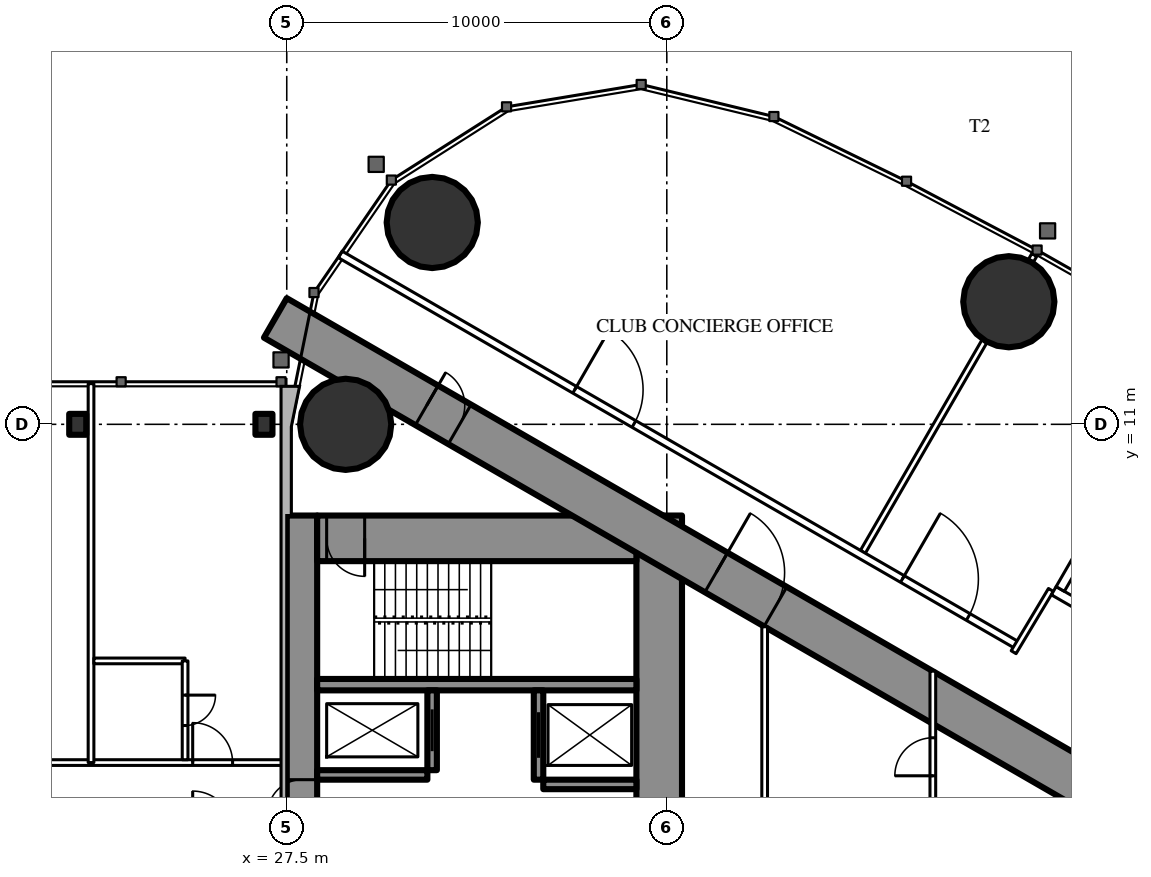
"""IFC4 building model, lengths in metres.
Left out: names, types, materials, properties, quantities, classifications, styles, units other than length and angle.
Written with IfcOpenShell. Run it as: python <this file> out.ifc"""

import sys

from ifc_helpers import new_model, si_unit, direction, frame, frame_2d, origin, origin_2d, place, context, subcontext, project, spatial, rectangle, circle, i_section, extrude, element, fill, save


model = new_model("IFC4")
c1 = context("Model", 3, precision=1e-05, world=origin(), true_north=direction((0.0, 1.0)))
c2 = subcontext(c1, "Body", "Model", "MODEL_VIEW")
j1 = project(units=[si_unit("LENGTHUNIT", "METRE"), si_unit("PLANEANGLEUNIT", "RADIAN")], contexts=[c1])
p1 = place(None, origin())
s1 = spatial("IfcSite", under=j1, at=p1, CompositionType="ELEMENT")
p2 = place(p1, origin())
s2 = spatial("IfcBuilding", under=s1, at=p2, CompositionType="ELEMENT")
p3 = place(p2, frame((0.0, 0.0, 247.7)))
s3 = spatial("IfcBuildingStorey", under=s2, at=p3, CompositionType="ELEMENT", Elevation=247.7)
for number, where, z_axis, x_axis in (
    (1, (31.328, 16.311, 0.0), (0.0, 0.0, 1.0), (1.0, 0.0, 0.0)),
    (2, (29.05, 11.0, 0.0), (0.0, 0.0, 1.0), (1.0, 0.0, 0.0)),
    (3, (46.499, 14.226, 0.0), (0.0, 0.0, 1.0), (1.0, 0.0, 0.0)),
):
    element("IfcColumn", number, at=place(p3, frame(where, z_axis=z_axis, x_axis=x_axis)), inside=s3, PredefinedType="COLUMN", context=c2, shape_type="SweptSolid", body=[
        extrude(circle(Radius=1.2, at=origin_2d()), origin(), (0.0, 0.0, 1.0), 4.2),
    ])
p4 = place(p3, frame((27.9, -8.6, 0.0), z_axis=(0.0, 0.0, 1.0), x_axis=(0.0, 1.0, 0.0)))
e4 = element("IfcWall", 4, at=p4, inside=s3, PredefinedType="SHEAR", context=c2, shape_type="SweptSolid", body=[
    extrude(rectangle(XDim=17.2, YDim=0.8, at=frame_2d((8.6, 0.0))), origin(), (0.0, 0.0, 1.0), 4.2),
])
p5 = place(p4, frame((9.35, 0.0, 0.0)))
e5 = element("IfcOpeningElement", 5, at=p5, cuts=e4, PredefinedType="OPENING", context=c2, shape_type="SweptSolid", body=[
    extrude(rectangle(XDim=0.9, YDim=2.2, at=frame_2d((0.45, 1.1))), frame((0.0, 0.41, 0.0), z_axis=(0.0, -1.0, 0.0), x_axis=(1.0, 0.0, 0.0)), (0.0, 0.0, 1.0), 0.82),
])
p6 = place(p3, frame((37.3, -8.6, 0.0), z_axis=(0.0, 0.0, 1.0), x_axis=(0.0, 1.0, 0.0)))
e6 = element("IfcWall", 6, at=p6, inside=s3, PredefinedType="SHEAR", context=c2, shape_type="SweptSolid", body=[
    extrude(rectangle(XDim=17.2, YDim=1.2, at=frame_2d((8.6, 0.0))), origin(), (0.0, 0.0, 1.0), 4.2),
])
p7 = place(p6, frame((7.7, 0.0, 0.0)))
e7 = element("IfcOpeningElement", 7, at=p7, cuts=e6, PredefinedType="OPENING", context=c2, shape_type="SweptSolid", body=[
    extrude(rectangle(XDim=1.8, YDim=2.2, at=frame_2d((0.9, 1.1))), frame((0.0, 0.61, 0.0), z_axis=(0.0, -1.0, 0.0), x_axis=(1.0, 0.0, 0.0)), (0.0, 0.0, 1.0), 1.22),
])
p8 = place(p3, frame((28.3, 8.0, 0.0), z_axis=(0.0, 0.0, 1.0), x_axis=(1.0, 0.0, 0.0)))
e8 = element("IfcWall", 8, at=p8, inside=s3, PredefinedType="SHEAR", context=c2, shape_type="SweptSolid", body=[
    extrude(rectangle(XDim=8.4, YDim=1.2, at=frame_2d((4.2, 0.0))), origin(), (0.0, 0.0, 1.0), 4.2),
])
p9 = place(p8, frame((0.25, 0.0, 0.0)))
e9 = element("IfcOpeningElement", 9, at=p9, cuts=e8, PredefinedType="OPENING", context=c2, shape_type="SweptSolid", body=[
    extrude(rectangle(XDim=1.0, YDim=2.2, at=frame_2d((0.5, 1.1))), frame((0.0, 0.61, 0.0), z_axis=(0.0, -1.0, 0.0), x_axis=(1.0, 0.0, 0.0)), (0.0, 0.0, 1.0), 1.22),
])
p10 = place(p3, frame((28.3, 4.15, 0.0), z_axis=(0.0, 0.0, 1.0), x_axis=(1.0, 0.0, 0.0)))
e10 = element("IfcWall", 10, at=p10, inside=s3, PredefinedType="SHEAR", context=c2, shape_type="SweptSolid", body=[
    extrude(rectangle(XDim=8.4, YDim=0.3, at=frame_2d((4.2, 0.0))), origin(), (0.0, 0.0, 1.0), 4.2),
])
p11 = place(p3, frame((31.325, 1.9, 0.0), z_axis=(0.0, 0.0, 1.0), x_axis=(0.0, 1.0, 0.0)))
e11 = element("IfcWall", 11, at=p11, inside=s3, PredefinedType="SHEAR", context=c2, shape_type="SweptSolid", body=[
    extrude(rectangle(XDim=2.1, YDim=0.25, at=frame_2d((1.05, 0.0))), origin(), (0.0, 0.0, 1.0), 4.2),
])
p12 = place(p11, frame((0.5, 0.0, 0.0)))
e12 = element("IfcOpeningElement", 12, at=p12, cuts=e11, PredefinedType="OPENING", context=c2, shape_type="SweptSolid", body=[
    extrude(rectangle(XDim=1.1, YDim=2.2, at=frame_2d((0.55, 1.1))), frame((0.0, 0.135, 0.0), z_axis=(0.0, -1.0, 0.0), x_axis=(1.0, 0.0, 0.0)), (0.0, 0.0, 1.0), 0.27),
])
p13 = place(p3, frame((34.125, 1.65, 0.0), z_axis=(0.0, 0.0, 1.0), x_axis=(0.0, 1.0, 0.0)))
e13 = element("IfcWall", 13, at=p13, inside=s3, PredefinedType="SHEAR", context=c2, shape_type="SweptSolid", body=[
    extrude(rectangle(XDim=2.35, YDim=0.25, at=frame_2d((1.175, 0.0))), origin(), (0.0, 0.0, 1.0), 4.2),
])
p14 = place(p13, frame((0.575, 0.0, 0.0)))
e14 = element("IfcOpeningElement", 14, at=p14, cuts=e13, PredefinedType="OPENING", context=c2, shape_type="SweptSolid", body=[
    extrude(rectangle(XDim=1.2, YDim=2.2, at=frame_2d((0.6, 1.1))), frame((0.0, 0.135, 0.0), z_axis=(0.0, -1.0, 0.0), x_axis=(1.0, 0.0, 0.0)), (0.0, 0.0, 1.0), 0.27),
])
p15 = place(p3, frame((28.3, 1.775, 0.0), z_axis=(0.0, 0.0, 1.0), x_axis=(1.0, 0.0, 0.0)))
e15 = element("IfcWall", 15, at=p15, inside=s3, PredefinedType="SHEAR", context=c2, shape_type="SweptSolid", body=[
    extrude(rectangle(XDim=2.9, YDim=0.25, at=frame_2d((1.45, 0.0))), origin(), (0.0, 0.0, 1.0), 4.2),
])
p16 = place(p3, frame((34.25, 1.525, 0.0), z_axis=(0.0, 0.0, 1.0), x_axis=(1.0, 0.0, 0.0)))
e16 = element("IfcWall", 16, at=p16, inside=s3, PredefinedType="SHEAR", context=c2, shape_type="SweptSolid", body=[
    extrude(rectangle(XDim=2.45, YDim=0.25, at=frame_2d((1.225, 0.0))), origin(), (0.0, 0.0, 1.0), 4.2),
])
p17 = place(p3, frame((27.2, 13.8, 0.0), z_axis=(0.0, 0.0, 1.0), x_axis=(0.866024515034, -0.500001539357, 0.0)))
e17 = element("IfcWall", 17, at=p17, inside=s3, PredefinedType="SHEAR", context=c2, shape_type="SweptSolid", body=[
    extrude(rectangle(XDim=26.907, YDim=1.2, at=frame_2d((13.454, 0.0))), origin(), (0.0, 0.0, 1.0), 4.2),
])
p18 = place(p17, frame((4.6, 0.0, 0.0)))
e18 = element("IfcOpeningElement", 18, at=p18, cuts=e17, PredefinedType="OPENING", context=c2, shape_type="SweptSolid", body=[
    extrude(rectangle(XDim=1.0, YDim=2.2, at=frame_2d((0.5, 1.1))), frame((0.0, 0.61, 0.0), z_axis=(0.0, -1.0, 0.0), x_axis=(1.0, 0.0, 0.0)), (0.0, 0.0, 1.0), 1.22),
])
p19 = place(p17, frame((13.395, 0.0, 0.0)))
e19 = element("IfcOpeningElement", 19, at=p19, cuts=e17, PredefinedType="OPENING", context=c2, shape_type="SweptSolid", body=[
    extrude(rectangle(XDim=1.8, YDim=2.2, at=frame_2d((0.9, 1.1))), frame((0.0, 0.61, 0.0), z_axis=(0.0, -1.0, 0.0), x_axis=(1.0, 0.0, 0.0)), (0.0, 0.0, 1.0), 1.22),
])
for number, where, z_axis, x_axis in (
    (20, (22.0, 11.0, 0.0), (0.0, 0.0, 1.0), (1.0, 0.0, 0.0)),
    (21, (26.9, 11.0, 0.0), (0.0, 0.0, 1.0), (1.0, 0.0, 0.0)),
):
    element("IfcColumn", number, at=place(p3, frame(where, z_axis=z_axis, x_axis=x_axis)), inside=s3, PredefinedType="COLUMN", context=c2, shape_type="SweptSolid", body=[
        extrude(i_section(OverallWidth=0.448, OverallDepth=0.55, WebThickness=0.072, FlangeThickness=0.115, FilletRadius=0.02, at=origin_2d()), origin(), (0.0, 0.0, 1.0), 4.2),
    ])
p20 = place(p3, frame((42.66, 7.646, 0.0), z_axis=(0.0, 0.0, 1.0), x_axis=(0.499996592859, 0.866027370889, 0.0)))
e22 = element("IfcWall", 22, at=p20, inside=s3, PredefinedType="PARTITIONING", context=c2, shape_type="SweptSolid", body=[
    extrude(rectangle(XDim=6.398, YDim=0.15, at=frame_2d((3.199, 0.0))), origin(), (0.0, 0.0, 1.0), 3.05),
])
p21 = place(p3, frame((47.079, 15.3, 0.0), z_axis=(0.0, 0.0, 1.0), x_axis=(0.499212083968, 0.866479829667, 0.0)))
e23 = element("IfcWall", 23, at=p21, inside=s3, PredefinedType="PARTITIONING", context=c2, shape_type="SweptSolid", body=[
    extrude(rectangle(XDim=0.179, YDim=0.15, at=frame_2d((0.09, 0.0))), origin(), (0.0, 0.0, 1.0), 3.05),
])
p22 = place(p3, frame((28.907, 15.47, 0.0), z_axis=(0.0, 0.0, 1.0), x_axis=(0.866026627509, -0.499997880441, 0.0)))
e24 = element("IfcWall", 24, at=p22, inside=s3, PredefinedType="PARTITIONING", context=c2, shape_type="SweptSolid", body=[
    extrude(rectangle(XDim=20.563, YDim=0.2, at=frame_2d((10.282, 0.0))), origin(), (0.0, 0.0, 1.0), 3.95),
])
p23 = place(p22, frame((17.081, 0.0, 0.0)))
e25 = element("IfcOpeningElement", 25, at=p23, cuts=e24, PredefinedType="OPENING", context=c2, shape_type="SweptSolid", body=[
    extrude(rectangle(XDim=2.0, YDim=2.4, at=frame_2d((1.0, 1.2))), frame((0.0, 0.11, 0.0), z_axis=(0.0, -1.0, 0.0), x_axis=(1.0, 0.0, 0.0)), (0.0, 0.0, 1.0), 0.22),
])
p24 = place(p22, frame((7.124, 0.0, 0.0)))
e26 = element("IfcOpeningElement", 26, at=p24, cuts=e24, PredefinedType="OPENING", context=c2, shape_type="SweptSolid", body=[
    extrude(rectangle(XDim=1.8, YDim=2.2, at=frame_2d((0.9, 1.1))), frame((0.0, 0.11, 0.0), z_axis=(0.0, -1.0, 0.0), x_axis=(1.0, 0.0, 0.0)), (0.0, 0.0, 1.0), 0.22),
])
p25 = place(p3, frame((47.606, 6.642, 0.0), z_axis=(0.0, 0.0, 1.0), x_axis=(-0.51353662755, -0.858067673418, 0.0)))
e27 = element("IfcWall", 27, at=p25, inside=s3, PredefinedType="PARTITIONING", context=c2, shape_type="SweptSolid", body=[
    extrude(rectangle(XDim=1.91, YDim=0.15, at=frame_2d((0.955, 0.0))), origin(), (0.0, 0.0, 1.0), 3.95),
])
p26 = place(p3, frame((40.075, -5.674, 0.0), z_axis=(0.0, 0.0, 1.0), x_axis=(0.0, 1.0, 0.0)))
e28 = element("IfcWall", 28, at=p26, inside=s3, PredefinedType="PARTITIONING", context=c2, shape_type="SweptSolid", body=[
    extrude(rectangle(XDim=11.348, YDim=0.15, at=frame_2d((5.674, 0.0))), origin(), (0.0, 0.0, 1.0), 3.95),
])
p27 = place(p26, frame((4.774, 0.0, 0.0)))
e29 = element("IfcOpeningElement", 29, at=p27, cuts=e28, PredefinedType="OPENING", context=c2, shape_type="SweptSolid", body=[
    extrude(rectangle(XDim=1.8, YDim=2.2, at=frame_2d((0.9, 1.1))), frame((0.0, 0.085, 0.0), z_axis=(0.0, -1.0, 0.0), x_axis=(1.0, 0.0, 0.0)), (0.0, 0.0, 1.0), 0.17),
])
p28 = place(p3, frame((44.5, -4.505, 0.0), z_axis=(0.0, 0.0, 1.0), x_axis=(0.0, 1.0, 0.0)))
e30 = element("IfcWall", 30, at=p28, inside=s3, PredefinedType="PARTITIONING", context=c2, shape_type="SweptSolid", body=[
    extrude(rectangle(XDim=9.009, YDim=0.15, at=frame_2d((4.505, 0.0))), origin(), (0.0, 0.0, 1.0), 3.95),
])
p29 = place(p28, frame((1.752, 0.0, 0.0)))
e31 = element("IfcOpeningElement", 31, at=p29, cuts=e30, PredefinedType="OPENING", context=c2, shape_type="SweptSolid", body=[
    extrude(rectangle(XDim=1.0, YDim=2.2, at=frame_2d((0.5, 1.1))), frame((0.0, 0.085, 0.0), z_axis=(0.0, -1.0, 0.0), x_axis=(1.0, 0.0, 0.0)), (0.0, 0.0, 1.0), 0.17),
])
p30 = place(p28, frame((6.257, 0.0, 0.0)))
e32 = element("IfcOpeningElement", 32, at=p30, cuts=e30, PredefinedType="OPENING", context=c2, shape_type="SweptSolid", body=[
    extrude(rectangle(XDim=1.0, YDim=2.2, at=frame_2d((0.5, 1.1))), frame((0.0, 0.085, 0.0), z_axis=(0.0, -1.0, 0.0), x_axis=(1.0, 0.0, 0.0)), (0.0, 0.0, 1.0), 0.17),
])
p31 = place(p3, frame((-27.5, 2.1, 0.0), z_axis=(0.0, 0.0, 1.0), x_axis=(1.0, 0.0, 0.0)))
e33 = element("IfcWall", 33, at=p31, inside=s3, PredefinedType="PARTITIONING", context=c2, shape_type="SweptSolid", body=[
    extrude(rectangle(XDim=55.0, YDim=0.15, at=frame_2d((27.5, 0.0))), origin(), (0.0, 0.0, 1.0), 4.0),
])
p32 = place(p31, frame((2.025, 0.0, 0.0)))
e34 = element("IfcOpeningElement", 34, at=p32, cuts=e33, PredefinedType="OPENING", context=c2, shape_type="SweptSolid", body=[
    extrude(rectangle(XDim=1.05, YDim=2.4, at=frame_2d((0.525, 1.2))), frame((0.0, 0.085, 0.0), z_axis=(0.0, -1.0, 0.0), x_axis=(1.0, 0.0, 0.0)), (0.0, 0.0, 1.0), 0.17),
])
p33 = place(p31, frame((8.525, 0.0, 0.0)))
e35 = element("IfcOpeningElement", 35, at=p33, cuts=e33, PredefinedType="OPENING", context=c2, shape_type="SweptSolid", body=[
    extrude(rectangle(XDim=1.05, YDim=2.4, at=frame_2d((0.525, 1.2))), frame((0.0, 0.085, 0.0), z_axis=(0.0, -1.0, 0.0), x_axis=(1.0, 0.0, 0.0)), (0.0, 0.0, 1.0), 0.17),
])
p34 = place(p31, frame((19.525, 0.0, 0.0)))
e36 = element("IfcOpeningElement", 36, at=p34, cuts=e33, PredefinedType="OPENING", context=c2, shape_type="SweptSolid", body=[
    extrude(rectangle(XDim=1.05, YDim=2.4, at=frame_2d((0.525, 1.2))), frame((0.0, 0.085, 0.0), z_axis=(0.0, -1.0, 0.0), x_axis=(1.0, 0.0, 0.0)), (0.0, 0.0, 1.0), 0.17),
])
p35 = place(p31, frame((30.525, 0.0, 0.0)))
e37 = element("IfcOpeningElement", 37, at=p35, cuts=e33, PredefinedType="OPENING", context=c2, shape_type="SweptSolid", body=[
    extrude(rectangle(XDim=1.05, YDim=2.4, at=frame_2d((0.525, 1.2))), frame((0.0, 0.085, 0.0), z_axis=(0.0, -1.0, 0.0), x_axis=(1.0, 0.0, 0.0)), (0.0, 0.0, 1.0), 0.17),
])
p36 = place(p31, frame((41.525, 0.0, 0.0)))
e38 = element("IfcOpeningElement", 38, at=p36, cuts=e33, PredefinedType="OPENING", context=c2, shape_type="SweptSolid", body=[
    extrude(rectangle(XDim=1.05, YDim=2.4, at=frame_2d((0.525, 1.2))), frame((0.0, 0.085, 0.0), z_axis=(0.0, -1.0, 0.0), x_axis=(1.0, 0.0, 0.0)), (0.0, 0.0, 1.0), 0.17),
])
p37 = place(p31, frame((52.525, 0.0, 0.0)))
e39 = element("IfcOpeningElement", 39, at=p37, cuts=e33, PredefinedType="OPENING", context=c2, shape_type="SweptSolid", body=[
    extrude(rectangle(XDim=1.05, YDim=2.4, at=frame_2d((0.525, 1.2))), frame((0.0, 0.085, 0.0), z_axis=(0.0, -1.0, 0.0), x_axis=(1.0, 0.0, 0.0)), (0.0, 0.0, 1.0), 0.17),
])
p38 = place(p3, frame((22.35, 2.1, 0.0), z_axis=(0.0, 0.0, 1.0), x_axis=(0.0, 1.0, 0.0)))
e40 = element("IfcWall", 40, at=p38, inside=s3, PredefinedType="PARTITIONING", context=c2, shape_type="SweptSolid", body=[
    extrude(rectangle(XDim=9.97, YDim=0.15, at=frame_2d((4.985, 0.0))), origin(), (0.0, 0.0, 1.0), 4.0),
])
p39 = place(p3, frame((22.425, 4.775, 0.0), z_axis=(0.0, 0.0, 1.0), x_axis=(1.0, 0.0, 0.0)))
e41 = element("IfcWall", 41, at=p39, inside=s3, PredefinedType="PARTITIONING", context=c2, shape_type="SweptSolid", body=[
    extrude(rectangle(XDim=2.4, YDim=0.15, at=frame_2d((1.2, 0.0))), origin(), (0.0, 0.0, 1.0), 4.0),
])
p40 = place(p3, frame((24.825, 2.175, 0.0), z_axis=(0.0, 0.0, 1.0), x_axis=(0.0, 1.0, 0.0)))
e42 = element("IfcWall", 42, at=p40, inside=s3, PredefinedType="PARTITIONING", context=c2, shape_type="SweptSolid", body=[
    extrude(rectangle(XDim=2.6, YDim=0.15, at=frame_2d((1.3, 0.0))), origin(), (0.0, 0.0, 1.0), 4.0),
])
p41 = place(p40, frame((0.9, 0.0, 0.0)))
e43 = element("IfcOpeningElement", 43, at=p41, cuts=e42, PredefinedType="OPENING", context=c2, shape_type="SweptSolid", body=[
    extrude(rectangle(XDim=0.8, YDim=2.2, at=frame_2d((0.4, 1.1))), frame((0.0, 0.085, 0.0), z_axis=(0.0, -1.0, 0.0), x_axis=(1.0, 0.0, 0.0)), (0.0, 0.0, 1.0), 0.17),
])
p42 = place(p3, frame((47.681, 6.622, 0.0), z_axis=(0.0, 0.0, 1.0), x_axis=(0.86603344179, -0.499986077507, 0.0)))
e44 = element("IfcWall", 44, at=p42, inside=s3, PredefinedType="PARTITIONING", context=c2, shape_type="SweptSolid", body=[
    extrude(rectangle(XDim=6.6, YDim=0.25, at=frame_2d((3.3, 0.0))), origin(), (0.0, 0.0, 1.0), 3.95),
])
p43 = place(p42, frame((0.75, 0.0, 0.0)))
e45 = element("IfcOpeningElement", 45, at=p43, cuts=e44, PredefinedType="OPENING", context=c2, shape_type="SweptSolid", body=[
    extrude(rectangle(XDim=1.1, YDim=2.2, at=frame_2d((0.55, 1.1))), frame((0.0, 0.135, 0.0), z_axis=(0.0, -1.0, 0.0), x_axis=(1.0, 0.0, 0.0)), (0.0, 0.0, 1.0), 0.27),
])
p44 = place(p42, frame((2.75, 0.0, 0.0)))
e46 = element("IfcOpeningElement", 46, at=p44, cuts=e44, PredefinedType="OPENING", context=c2, shape_type="SweptSolid", body=[
    extrude(rectangle(XDim=1.1, YDim=2.2, at=frame_2d((0.55, 1.1))), frame((0.0, 0.135, 0.0), z_axis=(0.0, -1.0, 0.0), x_axis=(1.0, 0.0, 0.0)), (0.0, 0.0, 1.0), 0.27),
])
p45 = place(p42, frame((4.75, 0.0, 0.0)))
e47 = element("IfcOpeningElement", 47, at=p45, cuts=e44, PredefinedType="OPENING", context=c2, shape_type="SweptSolid", body=[
    extrude(rectangle(XDim=1.1, YDim=2.2, at=frame_2d((0.55, 1.1))), frame((0.0, 0.135, 0.0), z_axis=(0.0, -1.0, 0.0), x_axis=(1.0, 0.0, 0.0)), (0.0, 0.0, 1.0), 0.27),
])
p46 = place(p3, frame((47.852, 6.668, 0.0), z_axis=(0.0, 0.0, 1.0), x_axis=(0.499929347863, 0.866066190972, 0.0)))
e48 = element("IfcWall", 48, at=p46, inside=s3, PredefinedType="PARTITIONING", context=c2, shape_type="SweptSolid", body=[
    extrude(rectangle(XDim=3.201, YDim=0.25, at=frame_2d((1.6, 0.0))), origin(), (0.0, 0.0, 1.0), 3.95),
])
p47 = place(p23, origin())
e49 = element("IfcDoor", 49, at=p47, inside=s3, OperationType="DOUBLE_DOOR_SINGLE_SWING", PredefinedType="DOOR", context=c2, shape_type="SweptSolid", body=[
    extrude(rectangle(XDim=2.0, YDim=2.4, at=frame_2d((1.0, 1.2))), frame((0.0, 0.025, 0.0), z_axis=(0.0, -1.0, 0.0), x_axis=(1.0, 0.0, 0.0)), (0.0, 0.0, 1.0), 0.05),
])
fill(e25, e49)
p48 = place(p24, origin())
e50 = element("IfcDoor", 50, at=p48, inside=s3, OperationType="DOUBLE_DOOR_SINGLE_SWING", PredefinedType="DOOR", context=c2, shape_type="SweptSolid", body=[
    extrude(rectangle(XDim=1.8, YDim=2.2, at=frame_2d((0.9, 1.1))), frame((0.0, 0.025, 0.0), z_axis=(0.0, -1.0, 0.0), x_axis=(1.0, 0.0, 0.0)), (0.0, 0.0, 1.0), 0.05),
])
fill(e26, e50)
p49 = place(p30, origin())
e51 = element("IfcDoor", 51, at=p49, inside=s3, OperationType="SINGLE_SWING_LEFT", PredefinedType="DOOR", context=c2, shape_type="SweptSolid", body=[
    extrude(rectangle(XDim=1.0, YDim=2.2, at=frame_2d((0.5, 1.1))), frame((0.0, 0.025, 0.0), z_axis=(0.0, -1.0, 0.0), x_axis=(1.0, 0.0, 0.0)), (0.0, 0.0, 1.0), 0.05),
])
fill(e32, e51)
p50 = place(p18, origin())
e52 = element("IfcDoor", 52, at=p50, inside=s3, OperationType="SINGLE_SWING_LEFT", PredefinedType="DOOR", context=c2, shape_type="SweptSolid", body=[
    extrude(rectangle(XDim=1.0, YDim=2.2, at=frame_2d((0.5, 1.1))), frame((0.0, 0.025, 0.0), z_axis=(0.0, -1.0, 0.0), x_axis=(1.0, 0.0, 0.0)), (0.0, 0.0, 1.0), 0.05),
])
fill(e18, e52)
p51 = place(p19, origin())
e53 = element("IfcDoor", 53, at=p51, inside=s3, OperationType="DOUBLE_DOOR_SINGLE_SWING", PredefinedType="DOOR", context=c2, shape_type="SweptSolid", body=[
    extrude(rectangle(XDim=1.8, YDim=2.2, at=frame_2d((0.9, 1.1))), frame((0.0, 0.025, 0.0), z_axis=(0.0, -1.0, 0.0), x_axis=(1.0, 0.0, 0.0)), (0.0, 0.0, 1.0), 0.05),
])
fill(e19, e53)
p52 = place(p9, origin())
e54 = element("IfcDoor", 54, at=p52, inside=s3, OperationType="SINGLE_SWING_RIGHT", PredefinedType="DOOR", context=c2, shape_type="SweptSolid", body=[
    extrude(rectangle(XDim=1.0, YDim=2.2, at=frame_2d((0.5, 1.1))), frame((0.0, 0.025, 0.0), z_axis=(0.0, -1.0, 0.0), x_axis=(1.0, 0.0, 0.0)), (0.0, 0.0, 1.0), 0.05),
])
fill(e9, e54)
p53 = place(p5, origin())
e55 = element("IfcDoor", 55, at=p53, inside=s3, OperationType="SINGLE_SWING_LEFT", PredefinedType="DOOR", context=c2, shape_type="SweptSolid", body=[
    extrude(rectangle(XDim=0.9, YDim=2.2, at=frame_2d((0.45, 1.1))), frame((0.0, 0.025, 0.0), z_axis=(0.0, -1.0, 0.0), x_axis=(1.0, 0.0, 0.0)), (0.0, 0.0, 1.0), 0.05),
])
fill(e5, e55)
p54 = place(p41, origin())
e56 = element("IfcDoor", 56, at=p54, inside=s3, OperationType="SINGLE_SWING_RIGHT", PredefinedType="DOOR", context=c2, shape_type="SweptSolid", body=[
    extrude(rectangle(XDim=0.8, YDim=2.2, at=frame_2d((0.4, 1.1))), frame((0.0, 0.025, 0.0), z_axis=(0.0, -1.0, 0.0), x_axis=(1.0, 0.0, 0.0)), (0.0, 0.0, 1.0), 0.05),
])
fill(e43, e56)
p55 = place(p37, origin())
e57 = element("IfcDoor", 57, at=p55, inside=s3, OperationType="SINGLE_SWING_LEFT", PredefinedType="DOOR", context=c2, shape_type="SweptSolid", body=[
    extrude(rectangle(XDim=1.05, YDim=2.4, at=frame_2d((0.525, 1.2))), frame((0.0, 0.025, 0.0), z_axis=(0.0, -1.0, 0.0), x_axis=(1.0, 0.0, 0.0)), (0.0, 0.0, 1.0), 0.05),
])
fill(e39, e57)
p56 = place(p12, origin())
e58 = element("IfcDoor", 58, at=p56, inside=s3, OperationType="SLIDING_TO_LEFT", PredefinedType="USERDEFINED", context=c2, shape_type="SweptSolid", body=[
    extrude(rectangle(XDim=1.1, YDim=2.2, at=frame_2d((0.55, 1.1))), frame((0.0, 0.025, 0.0), z_axis=(0.0, -1.0, 0.0), x_axis=(1.0, 0.0, 0.0)), (0.0, 0.0, 1.0), 0.05),
])
fill(e12, e58)
p57 = place(p14, origin())
e59 = element("IfcDoor", 59, at=p57, inside=s3, OperationType="DOUBLE_DOOR_SLIDING", PredefinedType="USERDEFINED", context=c2, shape_type="SweptSolid", body=[
    extrude(rectangle(XDim=1.2, YDim=2.2, at=frame_2d((0.6, 1.1))), frame((0.0, 0.025, 0.0), z_axis=(0.0, -1.0, 0.0), x_axis=(1.0, 0.0, 0.0)), (0.0, 0.0, 1.0), 0.05),
])
fill(e14, e59)
save(model, sys.argv[1])
